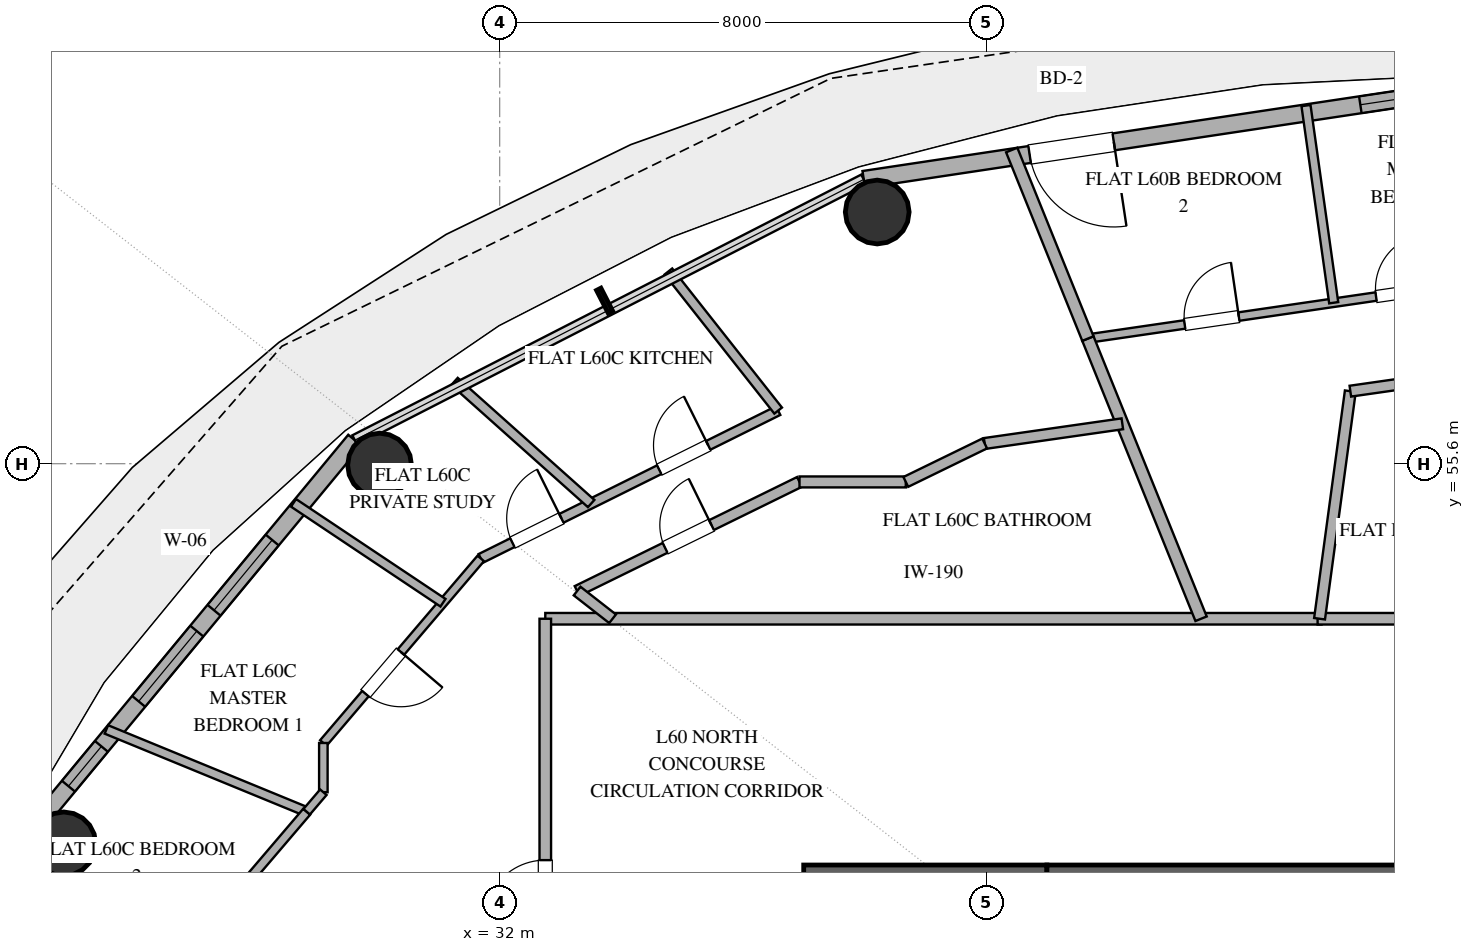
"""IFC4 building model, lengths in metres.
Left out: names, types, materials, properties, quantities, classifications, styles, units other than length and angle.
Written with IfcOpenShell. Run it as: python <this file> out.ifc"""

import sys

from ifc_helpers import new_model, si_unit, direction, frame, frame_2d, origin, origin_2d, place, context, subcontext, project, spatial, rectangle, hollow_circle, extrude, element, fill, save


model = new_model("IFC4")
c1 = context("Model", 3, precision=1e-05, world=origin(), true_north=direction((0.0, 1.0)))
c2 = subcontext(c1, "Body", "Model", "MODEL_VIEW")
j1 = project(units=[si_unit("LENGTHUNIT", "METRE"), si_unit("PLANEANGLEUNIT", "RADIAN")], contexts=[c1])
p1 = place(None, origin())
s1 = spatial("IfcSite", under=j1, at=p1, CompositionType="ELEMENT")
p2 = place(p1, origin())
s2 = spatial("IfcBuilding", under=s1, at=p2, CompositionType="ELEMENT")
p3 = place(p2, frame((0.0, 0.0, 235.2)))
s3 = spatial("IfcBuildingStorey", under=s2, at=p3, CompositionType="ELEMENT", Elevation=235.2)
p4 = place(p3, frame((37.0, 48.8, 0.0), z_axis=(0.0, 0.0, 1.0), x_axis=(1.0, 0.0, 0.0)))
e1 = element("IfcWall", 1, at=p4, inside=s3, PredefinedType="SHEAR", context=c2, shape_type="SweptSolid", body=[
    extrude(rectangle(XDim=4.0, YDim=0.4, at=frame_2d((2.0, 0.0))), origin(), (0.0, 0.0, 1.0), 3.36),
])
p5 = place(p3, frame((41.0, 48.8, 0.0), z_axis=(0.0, 0.0, 1.0), x_axis=(1.0, 0.0, 0.0)))
e2 = element("IfcWall", 2, at=p5, inside=s3, PredefinedType="SHEAR", context=c2, shape_type="SweptSolid", body=[
    extrude(rectangle(XDim=14.0, YDim=0.4, at=frame_2d((7.0, 0.0))), origin(), (0.0, 0.0, 1.0), 3.36),
])
p6 = place(p5, frame((6.1, 0.0, 0.0)))
e3 = element("IfcOpeningElement", 3, at=p6, cuts=e2, PredefinedType="OPENING", context=c2, shape_type="SweptSolid", body=[
    extrude(rectangle(XDim=1.8, YDim=2.25, at=frame_2d((0.9, 1.125))), frame((0.0, 0.21, 0.0), z_axis=(0.0, -1.0, 0.0), x_axis=(1.0, 0.0, 0.0)), (0.0, 0.0, 1.0), 0.42),
])
for number, where, z_axis, x_axis in (
    (4, (38.209, 59.739, 0.0), (0.0, 0.0, 1.0), (1.0, 0.0, 0.0)),
    (5, (30.025, 55.576, 0.0), (0.0, 0.0, 1.0), (1.0, 0.0, 0.0)),
    (6, (24.831, 49.347, 0.0), (0.0, 0.0, 1.0), (1.0, 0.0, 0.0)),
):
    element("IfcColumn", number, at=place(p3, frame(where, z_axis=z_axis, x_axis=x_axis)), inside=s3, PredefinedType="COLUMN", context=c2, shape_type="SweptSolid", body=[
        extrude(hollow_circle(Radius=0.525, WallThickness=0.028, at=origin_2d()), origin(), (0.0, 0.0, 1.0), 3.36),
    ])
p7 = place(p3, frame((48.0, 61.78, 0.0), z_axis=(0.0, 0.0, 1.0), x_axis=(-0.988882522213, -0.148698881169, 0.0)))
e7 = element("IfcWall", 7, at=p7, inside=s3, PredefinedType="SOLIDWALL", context=c2, shape_type="SweptSolid", body=[
    extrude(rectangle(XDim=10.125, YDim=0.28, at=frame_2d((5.062, 0.0))), origin(), (0.0, 0.0, 1.0), 3.36),
])
p8 = place(p7, frame((5.967, 0.0, 0.0)))
e8 = element("IfcOpeningElement", 8, at=p8, cuts=e7, PredefinedType="OPENING", context=c2, shape_type="SweptSolid", body=[
    extrude(rectangle(XDim=1.4, YDim=2.2, at=frame_2d((0.7, 1.1))), frame((0.0, 0.15, 0.0), z_axis=(0.0, -1.0, 0.0), x_axis=(1.0, 0.0, 0.0)), (0.0, 0.0, 1.0), 0.3),
])
p9 = place(p7, frame((0.866, 0.0, 0.85)))
e9 = element("IfcOpeningElement", 9, at=p9, cuts=e7, PredefinedType="OPENING", context=c2, shape_type="SweptSolid", body=[
    extrude(rectangle(XDim=1.0, YDim=1.8, at=frame_2d((0.5, 0.9))), frame((0.0, 0.15, 0.0), z_axis=(0.0, -1.0, 0.0), x_axis=(1.0, 0.0, 0.0)), (0.0, 0.0, 1.0), 0.3),
])
p10 = place(p3, frame((29.617, 55.987, 0.0), z_axis=(0.0, 0.0, 1.0), x_axis=(-0.63761509934, -0.770355103243, 0.0)))
e10 = element("IfcWall", 10, at=p10, inside=s3, PredefinedType="SOLIDWALL", context=c2, shape_type="SweptSolid", body=[
    extrude(rectangle(XDim=8.33, YDim=0.28, at=frame_2d((4.165, 0.0))), origin(), (0.0, 0.0, 1.0), 3.36),
])
p11 = place(p10, frame((2.131, 0.0, 0.85)))
e11 = element("IfcOpeningElement", 11, at=p11, cuts=e10, PredefinedType="OPENING", context=c2, shape_type="SweptSolid", body=[
    extrude(rectangle(XDim=1.5, YDim=2.0, at=frame_2d((0.75, 1.0))), frame((0.0, 0.15, 0.0), z_axis=(0.0, -1.0, 0.0), x_axis=(1.0, 0.0, 0.0)), (0.0, 0.0, 1.0), 0.3),
])
p12 = place(p10, frame((4.075, 0.0, 0.85)))
e12 = element("IfcOpeningElement", 12, at=p12, cuts=e10, PredefinedType="OPENING", context=c2, shape_type="SweptSolid", body=[
    extrude(rectangle(XDim=1.5, YDim=2.0, at=frame_2d((0.75, 1.0))), frame((0.0, 0.15, 0.0), z_axis=(0.0, -1.0, 0.0), x_axis=(1.0, 0.0, 0.0)), (0.0, 0.0, 1.0), 0.3),
])
p13 = place(p10, frame((6.536, 0.0, 0.85)))
e13 = element("IfcOpeningElement", 13, at=p13, cuts=e10, PredefinedType="OPENING", context=c2, shape_type="SweptSolid", body=[
    extrude(rectangle(XDim=0.85, YDim=1.8, at=frame_2d((0.425, 0.9))), frame((0.0, 0.15, 0.0), z_axis=(0.0, -1.0, 0.0), x_axis=(1.0, 0.0, 0.0)), (0.0, 0.0, 1.0), 0.3),
])
p14 = place(p3, frame((32.75, 53.05, 0.0), z_axis=(0.0, 0.0, 1.0), x_axis=(1.0, 0.0, 0.0)))
e14 = element("IfcWall", 14, at=p14, inside=s3, PredefinedType="PARTITIONING", context=c2, shape_type="SweptSolid", body=[
    extrude(rectangle(XDim=12.766, YDim=0.19, at=frame_2d((6.383, 0.0))), origin(), (0.0, 0.0, 1.0), 2.72),
])
p15 = place(p3, frame((32.75, 42.243, 0.0), z_axis=(0.0, 0.0, 1.0), x_axis=(0.0, 1.0, 0.0)))
e15 = element("IfcWall", 15, at=p15, inside=s3, PredefinedType="PARTITIONING", context=c2, shape_type="SweptSolid", body=[
    extrude(rectangle(XDim=10.807, YDim=0.19, at=frame_2d((5.404, 0.0))), origin(), (0.0, 0.0, 1.0), 2.72),
])
p16 = place(p15, frame((5.837, 0.0, 0.0)))
e16 = element("IfcOpeningElement", 16, at=p16, cuts=e15, PredefinedType="OPENING", context=c2, shape_type="SweptSolid", body=[
    extrude(rectangle(XDim=1.0, YDim=2.2, at=frame_2d((0.5, 1.1))), frame((0.0, 0.105, 0.0), z_axis=(0.0, -1.0, 0.0), x_axis=(1.0, 0.0, 0.0)), (0.0, 0.0, 1.0), 0.21),
])
p17 = place(p3, frame((45.452, 53.05, 0.0), z_axis=(0.0, 0.0, 1.0), x_axis=(1.0, 0.0, 0.0)))
e17 = element("IfcWall", 17, at=p17, inside=s3, PredefinedType="PARTITIONING", context=c2, shape_type="SweptSolid", body=[
    extrude(rectangle(XDim=17.798, YDim=0.19, at=frame_2d((8.899, 0.0))), origin(), (0.0, 0.0, 1.0), 2.72),
])
p18 = place(p17, frame((13.381, 0.0, 0.0)))
e18 = element("IfcOpeningElement", 18, at=p18, cuts=e17, PredefinedType="OPENING", context=c2, shape_type="SweptSolid", body=[
    extrude(rectangle(XDim=1.0, YDim=2.2, at=frame_2d((0.5, 1.1))), frame((0.0, 0.105, 0.0), z_axis=(0.0, -1.0, 0.0), x_axis=(1.0, 0.0, 0.0)), (0.0, 0.0, 1.0), 0.21),
])
p19 = place(p17, frame((6.359, 0.0, 0.0)))
e19 = element("IfcOpeningElement", 19, at=p19, cuts=e17, PredefinedType="OPENING", context=c2, shape_type="SweptSolid", body=[
    extrude(rectangle(XDim=1.0, YDim=2.2, at=frame_2d((0.5, 1.1))), frame((0.0, 0.105, 0.0), z_axis=(0.0, -1.0, 0.0), x_axis=(1.0, 0.0, 0.0)), (0.0, 0.0, 1.0), 0.21),
])
p20 = place(p3, frame((41.674, 57.657, 0.0), z_axis=(0.0, 0.0, 1.0), x_axis=(0.989537524877, 0.144275732054, 0.0)))
e20 = element("IfcWall", 20, at=p20, inside=s3, PredefinedType="PARTITIONING", context=c2, shape_type="SweptSolid", body=[
    extrude(rectangle(XDim=6.393, YDim=0.14, at=frame_2d((3.197, 0.0))), origin(), (0.0, 0.0, 1.0), 2.72),
])
p21 = place(p20, frame((1.609, 0.0, 0.0)))
e21 = element("IfcOpeningElement", 21, at=p21, cuts=e20, PredefinedType="OPENING", context=c2, shape_type="SweptSolid", body=[
    extrude(rectangle(XDim=0.9, YDim=2.1, at=frame_2d((0.45, 1.05))), frame((0.0, 0.08, 0.0), z_axis=(0.0, -1.0, 0.0), x_axis=(1.0, 0.0, 0.0)), (0.0, 0.0, 1.0), 0.16),
])
p22 = place(p20, frame((4.789, 0.0, 0.0)))
e22 = element("IfcOpeningElement", 22, at=p22, cuts=e20, PredefinedType="OPENING", context=c2, shape_type="SweptSolid", body=[
    extrude(rectangle(XDim=0.9, YDim=2.1, at=frame_2d((0.45, 1.05))), frame((0.0, 0.08, 0.0), z_axis=(0.0, -1.0, 0.0), x_axis=(1.0, 0.0, 0.0)), (0.0, 0.0, 1.0), 0.16),
])
p23 = place(p3, frame((33.273, 53.506, 0.0), z_axis=(0.0, 0.0, 1.0), x_axis=(0.89778136281, 0.440441397454, 0.0)))
e23 = element("IfcWall", 23, at=p23, inside=s3, PredefinedType="PLUMBINGWALL", context=c2, shape_type="SweptSolid", body=[
    extrude(rectangle(XDim=4.074, YDim=0.18, at=frame_2d((2.037, 0.0))), origin(), (0.0, 0.0, 1.0), 2.72),
])
p24 = place(p23, frame((1.612, 0.0, 0.0)))
e24 = element("IfcOpeningElement", 24, at=p24, cuts=e23, PredefinedType="OPENING", context=c2, shape_type="SweptSolid", body=[
    extrude(rectangle(XDim=0.85, YDim=2.1, at=frame_2d((0.425, 1.05))), frame((0.0, 0.1, 0.0), z_axis=(0.0, -1.0, 0.0), x_axis=(1.0, 0.0, 0.0)), (0.0, 0.0, 1.0), 0.2),
])
p25 = place(p3, frame((45.99, 56.792, 0.0), z_axis=(0.0, 0.0, 1.0), x_axis=(-0.134013985284, -0.990979440628, 0.0)))
e25 = element("IfcWall", 25, at=p25, inside=s3, PredefinedType="PLUMBINGWALL", context=c2, shape_type="SweptSolid", body=[
    extrude(rectangle(XDim=3.777, YDim=0.18, at=frame_2d((1.888, 0.0))), origin(), (0.0, 0.0, 1.0), 2.72),
])
p26 = place(p3, frame((25.531, 51.229, 0.0), z_axis=(0.0, 0.0, 1.0), x_axis=(0.925009924445, -0.37994294266, 0.0)))
e26 = element("IfcWall", 26, at=p26, inside=s3, PredefinedType="PARTITIONING", context=c2, shape_type="SweptSolid", body=[
    extrude(rectangle(XDim=3.562, YDim=0.15, at=frame_2d((1.781, 0.0))), origin(), (0.0, 0.0, 1.0), 2.72),
])
p27 = place(p3, frame((31.689, 54.042, 0.0), z_axis=(0.0, 0.0, 1.0), x_axis=(0.895479575413, 0.445102606168, 0.0)))
e27 = element("IfcWall", 27, at=p27, inside=s3, PredefinedType="PLUMBINGWALL", context=c2, shape_type="SweptSolid", body=[
    extrude(rectangle(XDim=5.462, YDim=0.16, at=frame_2d((2.731, 0.0))), origin(), (0.0, 0.0, 1.0), 2.72),
])
p28 = place(p27, frame((3.278, 0.0, 0.0)))
e28 = element("IfcOpeningElement", 28, at=p28, cuts=e27, PredefinedType="OPENING", context=c2, shape_type="SweptSolid", body=[
    extrude(rectangle(XDim=0.9, YDim=2.1, at=frame_2d((0.45, 1.05))), frame((0.0, 0.09, 0.0), z_axis=(0.0, -1.0, 0.0), x_axis=(1.0, 0.0, 0.0)), (0.0, 0.0, 1.0), 0.18),
])
p29 = place(p27, frame((0.581, 0.0, 0.0)))
e29 = element("IfcOpeningElement", 29, at=p29, cuts=e27, PredefinedType="OPENING", context=c2, shape_type="SweptSolid", body=[
    extrude(rectangle(XDim=0.9, YDim=2.1, at=frame_2d((0.45, 1.05))), frame((0.0, 0.09, 0.0), z_axis=(0.0, -1.0, 0.0), x_axis=(1.0, 0.0, 0.0)), (0.0, 0.0, 1.0), 0.18),
])
p30 = place(p3, frame((41.674, 57.657, 0.0), z_axis=(0.0, 0.0, 1.0), x_axis=(0.374573524941, -0.927197214412, 0.0)))
e30 = element("IfcWall", 30, at=p30, inside=s3, PredefinedType="PARTITIONING", context=c2, shape_type="SweptSolid", body=[
    extrude(rectangle(XDim=4.969, YDim=0.2, at=frame_2d((2.485, 0.0))), origin(), (0.0, 0.0, 1.0), 2.72),
])
p31 = place(p3, frame((41.674, 57.657, 0.0), z_axis=(0.0, 0.0, 1.0), x_axis=(-0.374572886439, 0.927197472357, 0.0)))
e31 = element("IfcWall", 31, at=p31, inside=s3, PredefinedType="PARTITIONING", context=c2, shape_type="SweptSolid", body=[
    extrude(rectangle(XDim=3.344, YDim=0.2, at=frame_2d((1.672, 0.0))), origin(), (0.0, 0.0, 1.0), 2.72),
])
p32 = place(p3, frame((45.717, 58.247, 0.0), z_axis=(0.0, 0.0, 1.0), x_axis=(-0.139134872395, 0.990273440664, 0.0)))
e32 = element("IfcWall", 32, at=p32, inside=s3, PredefinedType="PARTITIONING", context=c2, shape_type="SweptSolid", body=[
    extrude(rectangle(XDim=3.274, YDim=0.15, at=frame_2d((1.637, 0.0))), origin(), (0.0, 0.0, 1.0), 2.72),
])
p33 = place(p3, frame((31.689, 54.042, 0.0), z_axis=(0.0, 0.0, 1.0), x_axis=(-0.648985159088, -0.760801066826, 0.0)))
e33 = element("IfcWall", 33, at=p33, inside=s3, PredefinedType="PARTITIONING", context=c2, shape_type="SweptSolid", body=[
    extrude(rectangle(XDim=3.989, YDim=0.14, at=frame_2d((1.995, 0.0))), origin(), (0.0, 0.0, 1.0), 2.72),
])
p34 = place(p33, frame((2.023, 0.0, 0.0)))
e34 = element("IfcOpeningElement", 34, at=p34, cuts=e33, PredefinedType="OPENING", context=c2, shape_type="SweptSolid", body=[
    extrude(rectangle(XDim=0.9, YDim=2.1, at=frame_2d((0.45, 1.05))), frame((0.0, 0.08, 0.0), z_axis=(0.0, -1.0, 0.0), x_axis=(1.0, 0.0, 0.0)), (0.0, 0.0, 1.0), 0.16),
])
p35 = place(p3, frame((33.505, 54.945, 0.0), z_axis=(0.0, 0.0, 1.0), x_axis=(-0.745914664094, 0.66604152565, 0.0)))
e35 = element("IfcWall", 35, at=p35, inside=s3, PredefinedType="PLUMBINGWALL", context=c2, shape_type="SweptSolid", body=[
    extrude(rectangle(XDim=3.014, YDim=0.16, at=frame_2d((1.507, 0.0))), origin(), (0.0, 0.0, 1.0), 2.72),
])
p36 = place(p3, frame((28.609, 54.956, 0.0), z_axis=(0.0, 0.0, 1.0), x_axis=(0.831478101563, -0.555557527733, 0.0)))
e36 = element("IfcWall", 36, at=p36, inside=s3, PredefinedType="PARTITIONING", context=c2, shape_type="SweptSolid", body=[
    extrude(rectangle(XDim=2.956, YDim=0.15, at=frame_2d((1.478, 0.0))), origin(), (0.0, 0.0, 1.0), 2.72),
])
p37 = place(p3, frame((36.58, 56.473, 0.0), z_axis=(0.0, 0.0, 1.0), x_axis=(-0.619378047354, 0.785092882694, 0.0)))
e37 = element("IfcWall", 37, at=p37, inside=s3, PredefinedType="PLUMBINGWALL", context=c2, shape_type="SweptSolid", body=[
    extrude(rectangle(XDim=2.914, YDim=0.16, at=frame_2d((1.457, 0.0))), origin(), (0.0, 0.0, 1.0), 2.72),
])
p38 = place(p3, frame((39.976, 55.932, 0.0), z_axis=(0.0, 0.0, 1.0), x_axis=(0.989917445937, 0.141645509032, 0.0)))
e38 = element("IfcWall", 38, at=p38, inside=s3, PredefinedType="PLUMBINGWALL", context=c2, shape_type="SweptSolid", body=[
    extrude(rectangle(XDim=2.287, YDim=0.18, at=frame_2d((1.144, 0.0))), origin(), (0.0, 0.0, 1.0), 2.72),
])
p39 = place(p3, frame((48.0, 57.08, 0.0), z_axis=(0.0, 0.0, 1.0), x_axis=(-0.989918207634, -0.141640185666, 0.0)))
e39 = element("IfcWall", 39, at=p39, inside=s3, PredefinedType="PLUMBINGWALL", context=c2, shape_type="SweptSolid", body=[
    extrude(rectangle(XDim=2.031, YDim=0.18, at=frame_2d((1.015, 0.0))), origin(), (0.0, 0.0, 1.0), 2.72),
])
p40 = place(p3, frame((28.826, 49.876, 0.0), z_axis=(0.0, 0.0, 1.0), x_axis=(-0.649252114502, -0.760573265251, 0.0)))
e40 = element("IfcWall", 40, at=p40, inside=s3, PredefinedType="PARTITIONING", context=c2, shape_type="SweptSolid", body=[
    extrude(rectangle(XDim=2.013, YDim=0.15, at=frame_2d((1.007, 0.0))), origin(), (0.0, 0.0, 1.0), 2.72),
])
p41 = place(p3, frame((36.931, 55.3, 0.0), z_axis=(0.0, 0.0, 1.0), x_axis=(1.0, 0.0, 0.0)))
e41 = element("IfcWall", 41, at=p41, inside=s3, PredefinedType="PLUMBINGWALL", context=c2, shape_type="SweptSolid", body=[
    extrude(rectangle(XDim=1.748, YDim=0.18, at=frame_2d((0.874, 0.0))), origin(), (0.0, 0.0, 1.0), 2.72),
])
p42 = place(p3, frame((38.679, 55.3, 0.0), z_axis=(0.0, 0.0, 1.0), x_axis=(0.898916394035, 0.438120207861, 0.0)))
e42 = element("IfcWall", 42, at=p42, inside=s3, PredefinedType="PLUMBINGWALL", context=c2, shape_type="SweptSolid", body=[
    extrude(rectangle(XDim=1.443, YDim=0.18, at=frame_2d((0.721, 0.0))), origin(), (0.0, 0.0, 1.0), 2.72),
])
p43 = place(p3, frame((29.1, 51.007, 0.0), z_axis=(0.0, 0.0, 1.0), x_axis=(0.0, -1.0, 0.0)))
e43 = element("IfcWall", 43, at=p43, inside=s3, PredefinedType="PARTITIONING", context=c2, shape_type="SweptSolid", body=[
    extrude(rectangle(XDim=0.81, YDim=0.14, at=frame_2d((0.405, 0.0))), origin(), (0.0, 0.0, 1.0), 2.72),
])
p44 = place(p3, frame((33.857, 53.05, 0.0), z_axis=(0.0, 0.0, 1.0), x_axis=(-0.788214334349, 0.615400815019, 0.0)))
e44 = element("IfcWall", 44, at=p44, inside=s3, PredefinedType="PLUMBINGWALL", context=c2, shape_type="SweptSolid", body=[
    extrude(rectangle(XDim=0.74, YDim=0.18, at=frame_2d((0.37, 0.0))), origin(), (0.0, 0.0, 1.0), 2.72),
])
p45 = place(p3, frame((29.1, 50.197, 0.0), z_axis=(0.0, 0.0, 1.0), x_axis=(-0.649360360175, -0.760480849617, 0.0)))
e45 = element("IfcWall", 45, at=p45, inside=s3, PredefinedType="PARTITIONING", context=c2, shape_type="SweptSolid", body=[
    extrude(rectangle(XDim=0.422, YDim=0.14, at=frame_2d((0.211, 0.0))), origin(), (0.0, 0.0, 1.0), 2.72),
])
p46 = place(p8, origin())
e46 = element("IfcDoor", 46, at=p46, inside=s3, OperationType="SINGLE_SWING_LEFT", PredefinedType="DOOR", context=c2, shape_type="SweptSolid", body=[
    extrude(rectangle(XDim=1.4, YDim=2.2, at=frame_2d((0.7, 1.1))), frame((0.0, 0.025, 0.0), z_axis=(0.0, -1.0, 0.0), x_axis=(1.0, 0.0, 0.0)), (0.0, 0.0, 1.0), 0.05),
])
fill(e8, e46)
p47 = place(p11, origin())
e47 = element("IfcWindow", 47, at=p47, inside=s3, PartitioningType="SINGLE_PANEL", PredefinedType="WINDOW", context=c2, shape_type="SweptSolid", body=[
    extrude(rectangle(XDim=1.5, YDim=2.0, at=frame_2d((0.75, 1.0))), frame((0.0, 0.03, 0.0), z_axis=(0.0, -1.0, 0.0), x_axis=(1.0, 0.0, 0.0)), (0.0, 0.0, 1.0), 0.06),
])
fill(e11, e47)
p48 = place(p12, origin())
e48 = element("IfcWindow", 48, at=p48, inside=s3, PartitioningType="SINGLE_PANEL", PredefinedType="WINDOW", context=c2, shape_type="SweptSolid", body=[
    extrude(rectangle(XDim=1.5, YDim=2.0, at=frame_2d((0.75, 1.0))), frame((0.0, 0.03, 0.0), z_axis=(0.0, -1.0, 0.0), x_axis=(1.0, 0.0, 0.0)), (0.0, 0.0, 1.0), 0.06),
])
fill(e12, e48)
p49 = place(p9, origin())
e49 = element("IfcWindow", 49, at=p49, inside=s3, PartitioningType="SINGLE_PANEL", PredefinedType="WINDOW", context=c2, shape_type="SweptSolid", body=[
    extrude(rectangle(XDim=1.0, YDim=1.8, at=frame_2d((0.5, 0.9))), frame((0.0, 0.03, 0.0), z_axis=(0.0, -1.0, 0.0), x_axis=(1.0, 0.0, 0.0)), (0.0, 0.0, 1.0), 0.06),
])
fill(e9, e49)
p50 = place(p13, origin())
e50 = element("IfcWindow", 50, at=p50, inside=s3, PartitioningType="SINGLE_PANEL", PredefinedType="WINDOW", context=c2, shape_type="SweptSolid", body=[
    extrude(rectangle(XDim=0.85, YDim=1.8, at=frame_2d((0.425, 0.9))), frame((0.0, 0.03, 0.0), z_axis=(0.0, -1.0, 0.0), x_axis=(1.0, 0.0, 0.0)), (0.0, 0.0, 1.0), 0.06),
])
fill(e13, e50)
p51 = place(p16, origin())
e51 = element("IfcDoor", 51, at=p51, inside=s3, OperationType="SINGLE_SWING_LEFT", PredefinedType="DOOR", context=c2, shape_type="SweptSolid", body=[
    extrude(rectangle(XDim=1.0, YDim=2.2, at=frame_2d((0.5, 1.1))), frame((0.0, 0.025, 0.0), z_axis=(0.0, -1.0, 0.0), x_axis=(1.0, 0.0, 0.0)), (0.0, 0.0, 1.0), 0.05),
])
fill(e16, e51)
p52 = place(p21, origin())
e52 = element("IfcDoor", 52, at=p52, inside=s3, OperationType="SINGLE_SWING_RIGHT", PredefinedType="DOOR", context=c2, shape_type="SweptSolid", body=[
    extrude(rectangle(XDim=0.9, YDim=2.1, at=frame_2d((0.45, 1.05))), frame((0.0, 0.025, 0.0), z_axis=(0.0, -1.0, 0.0), x_axis=(1.0, 0.0, 0.0)), (0.0, 0.0, 1.0), 0.05),
])
fill(e21, e52)
p53 = place(p22, origin())
e53 = element("IfcDoor", 53, at=p53, inside=s3, OperationType="SINGLE_SWING_RIGHT", PredefinedType="DOOR", context=c2, shape_type="SweptSolid", body=[
    extrude(rectangle(XDim=0.9, YDim=2.1, at=frame_2d((0.45, 1.05))), frame((0.0, 0.025, 0.0), z_axis=(0.0, -1.0, 0.0), x_axis=(1.0, 0.0, 0.0)), (0.0, 0.0, 1.0), 0.05),
])
fill(e22, e53)
p54 = place(p24, origin())
e54 = element("IfcDoor", 54, at=p54, inside=s3, OperationType="SINGLE_SWING_RIGHT", PredefinedType="DOOR", context=c2, shape_type="SweptSolid", body=[
    extrude(rectangle(XDim=0.85, YDim=2.1, at=frame_2d((0.425, 1.05))), frame((0.0, 0.025, 0.0), z_axis=(0.0, -1.0, 0.0), x_axis=(1.0, 0.0, 0.0)), (0.0, 0.0, 1.0), 0.05),
])
fill(e24, e54)
p55 = place(p28, origin())
e55 = element("IfcDoor", 55, at=p55, inside=s3, OperationType="SINGLE_SWING_RIGHT", PredefinedType="DOOR", context=c2, shape_type="SweptSolid", body=[
    extrude(rectangle(XDim=0.9, YDim=2.1, at=frame_2d((0.45, 1.05))), frame((0.0, 0.025, 0.0), z_axis=(0.0, -1.0, 0.0), x_axis=(1.0, 0.0, 0.0)), (0.0, 0.0, 1.0), 0.05),
])
fill(e28, e55)
p56 = place(p29, origin())
e56 = element("IfcDoor", 56, at=p56, inside=s3, OperationType="SINGLE_SWING_RIGHT", PredefinedType="DOOR", context=c2, shape_type="SweptSolid", body=[
    extrude(rectangle(XDim=0.9, YDim=2.1, at=frame_2d((0.45, 1.05))), frame((0.0, 0.025, 0.0), z_axis=(0.0, -1.0, 0.0), x_axis=(1.0, 0.0, 0.0)), (0.0, 0.0, 1.0), 0.05),
])
fill(e29, e56)
p57 = place(p34, origin())
e57 = element("IfcDoor", 57, at=p57, inside=s3, OperationType="SINGLE_SWING_LEFT", PredefinedType="DOOR", context=c2, shape_type="SweptSolid", body=[
    extrude(rectangle(XDim=0.9, YDim=2.1, at=frame_2d((0.45, 1.05))), frame((0.0, 0.025, 0.0), z_axis=(0.0, -1.0, 0.0), x_axis=(1.0, 0.0, 0.0)), (0.0, 0.0, 1.0), 0.05),
])
fill(e34, e57)
save(model, sys.argv[1])
